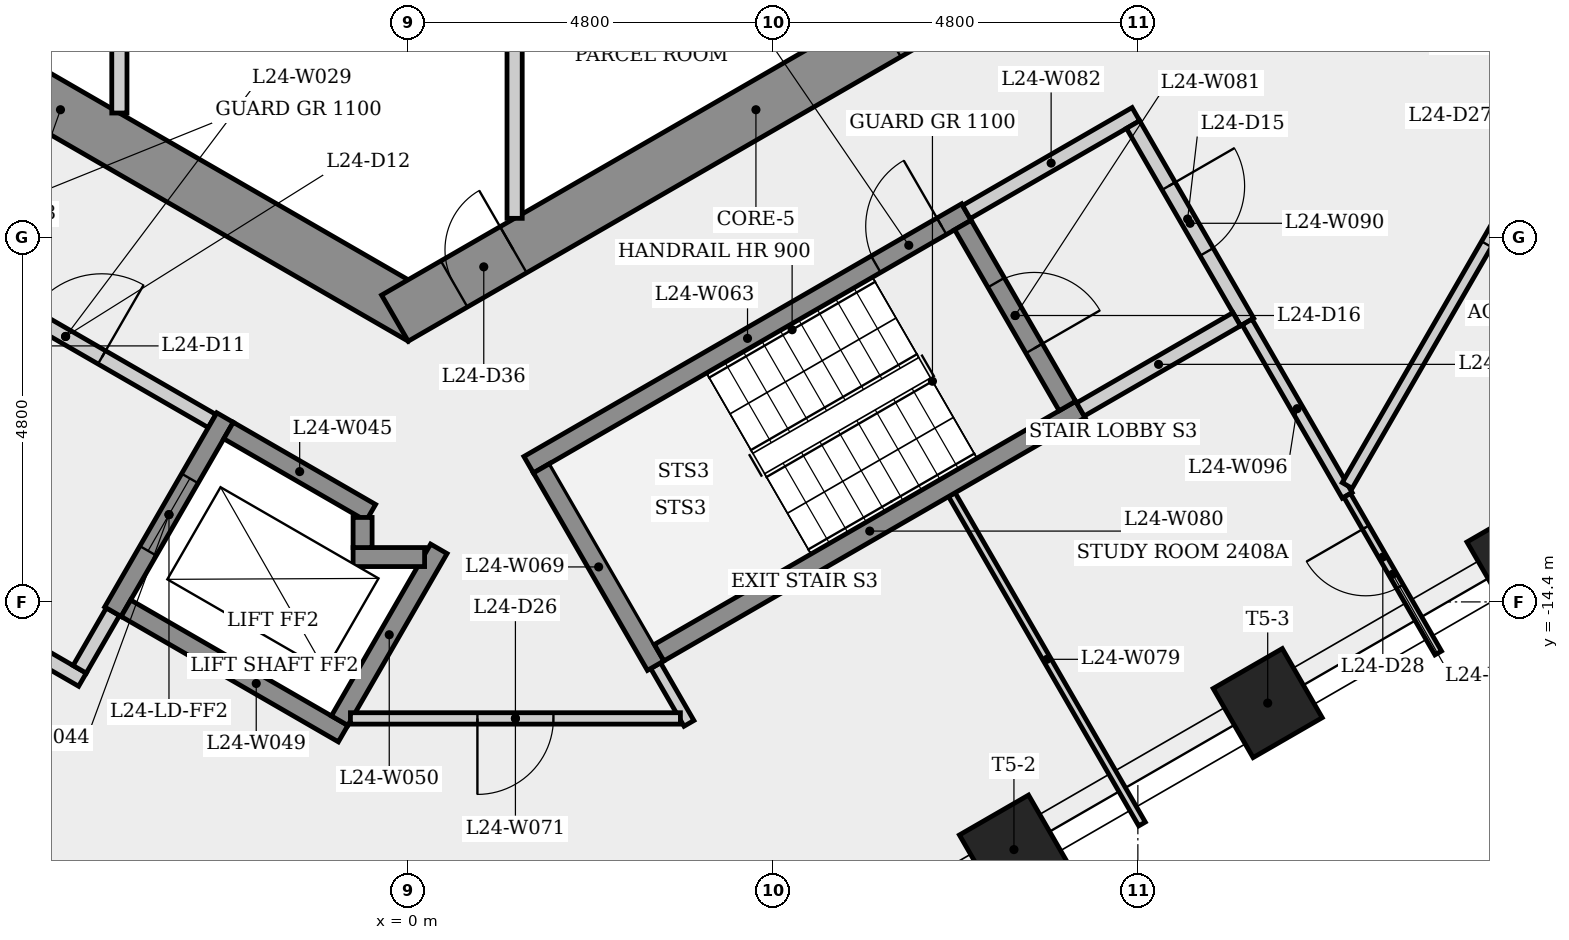
"""IFC4 building model, lengths in metres.
Left out: names, types, materials, properties, quantities, classifications, styles, units other than length and angle.
Written with IfcOpenShell. Run it as: python <this file> out.ifc"""

import sys

from ifc_helpers import new_model, si_unit, direction, frame, frame_2d, origin, origin_2d, place, context, subcontext, project, spatial, rectangle, extrude, element, fill, save


model = new_model("IFC4")
c1 = context("Model", 3, precision=1e-05, world=origin(), true_north=direction((0.0, 1.0)))
c2 = subcontext(c1, "Body", "Model", "MODEL_VIEW")
j1 = project(units=[si_unit("LENGTHUNIT", "METRE"), si_unit("PLANEANGLEUNIT", "RADIAN")], contexts=[c1])
p1 = place(None, origin())
s1 = spatial("IfcSite", under=j1, at=p1, CompositionType="ELEMENT")
p2 = place(p1, origin())
s2 = spatial("IfcBuilding", under=s1, at=p2, CompositionType="ELEMENT")
p3 = place(p2, frame((0.0, 0.0, 93.3)))
s3 = spatial("IfcBuildingStorey", under=s2, at=p3, CompositionType="ELEMENT", Elevation=93.3)
p4 = place(p3, frame((-9.325, -5.182, 0.0), z_axis=(0.0, 0.0, 1.0), x_axis=(0.866023993627, -0.500002442456, 0.0)))
e1 = element("IfcWall", 1, at=p4, inside=s3, PredefinedType="SHEAR", context=c2, shape_type="SweptSolid", body=[
    extrude(rectangle(XDim=10.97, YDim=0.7, at=frame_2d((5.485, 0.0))), origin(), (0.0, 0.0, 1.0), 3.4),
])
p5 = place(p4, frame((0.801, 0.0, 0.0)))
e2 = element("IfcOpeningElement", 2, at=p5, cuts=e1, PredefinedType="OPENING", context=c2, shape_type="SweptSolid", body=[
    extrude(rectangle(XDim=0.9, YDim=2.1, at=frame_2d((0.45, 1.05))), frame((0.0, 0.36, 0.0), z_axis=(0.0, -1.0, 0.0), x_axis=(1.0, 0.0, 0.0)), (0.0, 0.0, 1.0), 0.72),
])
p6 = place(p3, frame((-0.175, -10.667, 0.0), z_axis=(0.0, 0.0, 1.0), x_axis=(0.866023993627, 0.500002442456, 0.0)))
e3 = element("IfcWall", 3, at=p6, inside=s3, PredefinedType="SHEAR", context=c2, shape_type="SweptSolid", body=[
    extrude(rectangle(XDim=10.97, YDim=0.7, at=frame_2d((5.485, 0.0))), origin(), (0.0, 0.0, 1.0), 3.4),
])
p7 = place(p6, frame((0.9, 0.0, 0.0)))
e4 = element("IfcOpeningElement", 4, at=p7, cuts=e3, PredefinedType="OPENING", context=c2, shape_type="SweptSolid", body=[
    extrude(rectangle(XDim=0.9, YDim=2.1, at=frame_2d((0.45, 1.05))), frame((0.0, 0.36, 0.0), z_axis=(0.0, -1.0, 0.0), x_axis=(1.0, 0.0, 0.0)), (0.0, 0.0, 1.0), 0.72),
])
p8 = place(p6, frame((7.483, 0.0, 0.0)))
e5 = element("IfcOpeningElement", 5, at=p8, cuts=e3, PredefinedType="OPENING", context=c2, shape_type="SweptSolid", body=[
    extrude(rectangle(XDim=0.9, YDim=2.1, at=frame_2d((0.45, 1.05))), frame((0.0, 0.36, 0.0), z_axis=(0.0, -1.0, 0.0), x_axis=(1.0, 0.0, 0.0)), (0.0, 0.0, 1.0), 0.72),
])
for number, where, z_axis, x_axis in (
    (6, (7.969, -17.659, 0.0), (0.0, 0.0, 1.0), (0.5, -0.866, 0.0)),
    (7, (11.308, -15.731, 0.0), (0.0, 0.0, 1.0), (0.5, -0.866, 0.0)),
    (8, (14.647, -13.804, 0.0), (0.0, 0.0, 1.0), (0.5, -0.866, 0.0)),
):
    element("IfcColumn", number, at=place(p3, frame(where, z_axis=z_axis, x_axis=x_axis)), inside=s3, PredefinedType="COLUMN", context=c2, shape_type="SweptSolid", body=[
        extrude(rectangle(XDim=1.05, YDim=1.05, at=origin_2d()), origin(), (0.0, 0.0, 1.0), 3.4),
    ])
p9 = place(p3, frame((-6.435, -9.795, 0.0), z_axis=(0.0, 0.0, 1.0), x_axis=(0.866012907634, -0.500021643343, 0.0)))
e9 = element("IfcWall", 9, at=p9, inside=s3, PredefinedType="PARTITIONING", context=c2, shape_type="SweptSolid", body=[
    extrude(rectangle(XDim=4.45, YDim=0.2, at=frame_2d((2.225, 0.0))), origin(), (0.0, 0.0, 1.0), 3.05),
])
p10 = place(p9, frame((1.675, 0.0, 0.0)))
e10 = element("IfcOpeningElement", 10, at=p10, cuts=e9, PredefinedType="OPENING", context=c2, shape_type="SweptSolid", body=[
    extrude(rectangle(XDim=1.1, YDim=2.1, at=frame_2d((0.55, 1.05))), frame((0.0, 0.11, 0.0), z_axis=(0.0, -1.0, 0.0), x_axis=(1.0, 0.0, 0.0)), (0.0, 0.0, 1.0), 0.22),
])
p11 = place(p3, frame((-4.286, -15.423, 0.0), z_axis=(0.0, 0.0, 1.0), x_axis=(-0.866025371046, 0.500000056704, 0.0)))
e11 = element("IfcWall", 11, at=p11, inside=s3, PredefinedType="PARTITIONING", context=c2, shape_type="SweptSolid", body=[
    extrude(rectangle(XDim=1.7, YDim=0.2, at=frame_2d((0.85, 0.0))), origin(), (0.0, 0.0, 1.0), 3.05),
])
p12 = place(p3, frame((-3.885, -14.529, 0.0), z_axis=(0.0, 0.0, 1.0), x_axis=(-0.499859285417, -0.866106630146, 0.0)))
e12 = element("IfcWall", 12, at=p12, inside=s3, PredefinedType="PARTITIONING", context=c2, shape_type="SweptSolid", body=[
    extrude(rectangle(XDim=0.875, YDim=0.2, at=frame_2d((0.438, 0.0))), origin(), (0.0, 0.0, 1.0), 3.05),
])
p13 = place(p3, frame((-3.8, -5.275, 0.0), z_axis=(0.0, 0.0, 1.0), x_axis=(0.0, -1.0, 0.0)))
e13 = element("IfcWall", 13, at=p13, inside=s3, PredefinedType="PARTITIONING", context=c2, shape_type="SweptSolid", body=[
    extrude(rectangle(XDim=2.692, YDim=0.2, at=frame_2d((1.346, 0.0))), origin(), (0.0, 0.0, 1.0), 3.05),
])
p14 = place(p3, frame((-2.41, -11.974, 0.0), z_axis=(0.0, 0.0, 1.0), x_axis=(-0.500001826776, -0.866024349092, 0.0)))
e14 = element("IfcWall", 14, at=p14, inside=s3, PredefinedType="SHEAR", context=c2, shape_type="SweptSolid", body=[
    extrude(rectangle(XDim=2.95, YDim=0.25, at=frame_2d((1.475, 0.0))), origin(), (0.0, 0.0, 1.0), 3.05),
])
p15 = place(p14, frame((0.925, 0.0, 0.0)))
e15 = element("IfcOpeningElement", 15, at=p15, cuts=e14, PredefinedType="OPENING", context=c2, shape_type="SweptSolid", body=[
    extrude(rectangle(XDim=1.1, YDim=2.1, at=frame_2d((0.55, 1.05))), frame((0.0, 0.135, 0.0), z_axis=(0.0, -1.0, 0.0), x_axis=(1.0, 0.0, 0.0)), (0.0, 0.0, 1.0), 0.27),
])
p16 = place(p3, frame((-2.364, -12.145, 0.0), z_axis=(0.0, 0.0, 1.0), x_axis=(0.86603892542, -0.499976579108, 0.0)))
e16 = element("IfcWall", 16, at=p16, inside=s3, PredefinedType="SHEAR", context=c2, shape_type="SweptSolid", body=[
    extrude(rectangle(XDim=2.162, YDim=0.25, at=frame_2d((1.081, 0.0))), origin(), (0.0, 0.0, 1.0), 3.05),
])
p17 = place(p3, frame((-0.856, -16.133, 0.0), z_axis=(0.0, 0.0, 1.0), x_axis=(-0.866021716278, 0.500006386895, 0.0)))
e17 = element("IfcWall", 17, at=p17, inside=s3, PredefinedType="SHEAR", context=c2, shape_type="SweptSolid", body=[
    extrude(rectangle(XDim=3.3, YDim=0.25, at=frame_2d((1.65, 0.0))), origin(), (0.0, 0.0, 1.0), 3.05),
])
p18 = place(p3, frame((-0.902, -15.962, 0.0), z_axis=(0.0, 0.0, 1.0), x_axis=(0.499981517636, 0.866036074319, 0.0)))
e18 = element("IfcWall", 18, at=p18, inside=s3, PredefinedType="SHEAR", context=c2, shape_type="SweptSolid", body=[
    extrude(rectangle(XDim=2.61, YDim=0.25, at=frame_2d((1.305, 0.0))), origin(), (0.0, 0.0, 1.0), 3.05),
])
p19 = place(p3, frame((-0.725, -13.81, 0.0), z_axis=(0.0, 0.0, 1.0), x_axis=(1.0, 0.0, 0.0)))
e19 = element("IfcWall", 19, at=p19, inside=s3, PredefinedType="SHEAR", context=c2, shape_type="SweptSolid", body=[
    extrude(rectangle(XDim=0.941, YDim=0.25, at=frame_2d((0.47, 0.0))), origin(), (0.0, 0.0, 1.0), 3.4),
])
p20 = place(p3, frame((-0.6, -13.289, 0.0), z_axis=(0.0, 0.0, 1.0), x_axis=(0.0, -1.0, 0.0)))
e20 = element("IfcWall", 20, at=p20, inside=s3, PredefinedType="SHEAR", context=c2, shape_type="SweptSolid", body=[
    extrude(rectangle(XDim=0.396, YDim=0.25, at=frame_2d((0.198, 0.0))), origin(), (0.0, 0.0, 1.0), 3.4),
])
p21 = place(p3, frame((1.4, -5.275, 0.0), z_axis=(0.0, 0.0, 1.0), x_axis=(0.0, -1.0, 0.0)))
e21 = element("IfcWall", 21, at=p21, inside=s3, PredefinedType="PARTITIONING", context=c2, shape_type="SweptSolid", body=[
    extrude(rectangle(XDim=4.078, YDim=0.2, at=frame_2d((2.039, 0.0))), origin(), (0.0, 0.0, 1.0), 3.05),
])
p22 = place(p3, frame((1.585, -12.595, 0.0), z_axis=(0.0, 0.0, 1.0), x_axis=(0.866036417653, 0.499980922934, 0.0)))
e22 = element("IfcWall", 22, at=p22, inside=s3, PredefinedType="SHEAR", context=c2, shape_type="SweptSolid", body=[
    extrude(rectangle(XDim=6.65, YDim=0.25, at=frame_2d((3.325, 0.0))), origin(), (0.0, 0.0, 1.0), 3.05),
])
p23 = place(p22, frame((5.275, 0.0, 0.0)))
e23 = element("IfcOpeningElement", 23, at=p23, cuts=e22, PredefinedType="OPENING", context=c2, shape_type="SweptSolid", body=[
    extrude(rectangle(XDim=1.0, YDim=2.1, at=frame_2d((0.5, 1.05))), frame((0.0, 0.135, 0.0), z_axis=(0.0, -1.0, 0.0), x_axis=(1.0, 0.0, 0.0)), (0.0, 0.0, 1.0), 0.27),
])
p24 = place(p3, frame((3.256, -15.239, 0.0), z_axis=(0.0, 0.0, 1.0), x_axis=(0.499883169583, -0.866092845351, 0.0)))
e24 = element("IfcWall", 24, at=p24, inside=s3, PredefinedType="PARTITIONING", context=c2, shape_type="SweptSolid", body=[
    extrude(rectangle(XDim=0.877, YDim=0.15, at=frame_2d((0.438, 0.0))), origin(), (0.0, 0.0, 1.0), 3.05),
])
p25 = place(p3, frame((3.256, -15.239, 0.0), z_axis=(0.0, 0.0, 1.0), x_axis=(-0.50002537861, 0.866010750942, 0.0)))
e25 = element("IfcWall", 25, at=p25, inside=s3, PredefinedType="SHEAR", context=c2, shape_type="SweptSolid", body=[
    extrude(rectangle(XDim=3.0, YDim=0.25, at=frame_2d((1.5, 0.0))), origin(), (0.0, 0.0, 1.0), 3.05),
])
p26 = place(p3, frame((3.581, -15.933, 0.0), z_axis=(0.0, 0.0, 1.0), x_axis=(-1.0, 0.0, 0.0)))
e26 = element("IfcWall", 26, at=p26, inside=s3, PredefinedType="PARTITIONING", context=c2, shape_type="SweptSolid", body=[
    extrude(rectangle(XDim=4.341, YDim=0.15, at=frame_2d((2.171, 0.0))), origin(), (0.0, 0.0, 1.0), 3.05),
])
p27 = place(p26, frame((1.671, 0.0, 0.0)))
e27 = element("IfcOpeningElement", 27, at=p27, cuts=e26, PredefinedType="OPENING", context=c2, shape_type="SweptSolid", body=[
    extrude(rectangle(XDim=1.0, YDim=2.1, at=frame_2d((0.5, 1.05))), frame((0.0, 0.085, 0.0), z_axis=(0.0, -1.0, 0.0), x_axis=(1.0, 0.0, 0.0)), (0.0, 0.0, 1.0), 0.17),
])
p28 = place(p3, frame((7.153, -12.989, 0.0), z_axis=(0.0, 0.0, 1.0), x_axis=(0.500022324899, -0.866012514114, 0.0)))
e28 = element("IfcWall", 28, at=p28, inside=s3, PredefinedType="PARTITIONING", context=c2, shape_type="SweptSolid", body=[
    extrude(rectangle(XDim=5.004, YDim=0.1, at=frame_2d((2.502, 0.0))), origin(), (0.0, 0.0, 1.0), 3.05),
])
p29 = place(p3, frame((3.301, -15.068, 0.0), z_axis=(0.0, 0.0, 1.0), x_axis=(0.866035036182, 0.499983315828, 0.0)))
e29 = element("IfcWall", 29, at=p29, inside=s3, PredefinedType="SHEAR", context=c2, shape_type="SweptSolid", body=[
    extrude(rectangle(XDim=6.4, YDim=0.25, at=frame_2d((3.2, 0.0))), origin(), (0.0, 0.0, 1.0), 3.05),
])
p30 = place(p3, frame((7.298, -9.441, 0.0), z_axis=(0.0, 0.0, 1.0), x_axis=(0.500034990121, -0.866005201286, 0.0)))
e30 = element("IfcWall", 30, at=p30, inside=s3, PredefinedType="SHEAR", context=c2, shape_type="SweptSolid", body=[
    extrude(rectangle(XDim=2.75, YDim=0.25, at=frame_2d((1.375, 0.0))), origin(), (0.0, 0.0, 1.0), 3.05),
])
p31 = place(p30, frame((0.875, 0.0, 0.0)))
e31 = element("IfcOpeningElement", 31, at=p31, cuts=e30, PredefinedType="OPENING", context=c2, shape_type="SweptSolid", body=[
    extrude(rectangle(XDim=1.0, YDim=2.1, at=frame_2d((0.5, 1.05))), frame((0.0, 0.135, 0.0), z_axis=(0.0, -1.0, 0.0), x_axis=(1.0, 0.0, 0.0)), (0.0, 0.0, 1.0), 0.27),
])
p32 = place(p3, frame((7.344, -9.27, 0.0), z_axis=(0.0, 0.0, 1.0), x_axis=(0.866005588531, 0.500034319456, 0.0)))
e32 = element("IfcWall", 32, at=p32, inside=s3, PredefinedType="PARTITIONING", context=c2, shape_type="SweptSolid", body=[
    extrude(rectangle(XDim=2.575, YDim=0.2, at=frame_2d((1.288, 0.0))), origin(), (0.0, 0.0, 1.0), 3.05),
])
p33 = place(p3, frame((9.537, -8.119, 0.0), z_axis=(0.0, 0.0, 1.0), x_axis=(0.499990139034, -0.866031096941, 0.0)))
e33 = element("IfcWall", 33, at=p33, inside=s3, PredefinedType="PARTITIONING", context=c2, shape_type="SweptSolid", body=[
    extrude(rectangle(XDim=3.0, YDim=0.2, at=frame_2d((1.5, 0.0))), origin(), (0.0, 0.0, 1.0), 3.05),
])
p34 = place(p33, frame((0.935, 0.0, 0.0)))
e34 = element("IfcOpeningElement", 34, at=p34, cuts=e33, PredefinedType="OPENING", context=c2, shape_type="SweptSolid", body=[
    extrude(rectangle(XDim=1.0, YDim=2.1, at=frame_2d((0.5, 1.05))), frame((0.0, 0.11, 0.0), z_axis=(0.0, -1.0, 0.0), x_axis=(1.0, 0.0, 0.0)), (0.0, 0.0, 1.0), 0.22),
])
p35 = place(p3, frame((10.901, -10.681, 0.0), z_axis=(0.0, 0.0, 1.0), x_axis=(-0.866007538022, -0.500030943131, 0.0)))
e35 = element("IfcWall", 35, at=p35, inside=s3, PredefinedType="PARTITIONING", context=c2, shape_type="SweptSolid", body=[
    extrude(rectangle(XDim=2.375, YDim=0.2, at=frame_2d((1.188, 0.0))), origin(), (0.0, 0.0, 1.0), 3.05),
])
p36 = place(p3, frame((12.354, -12.998, 0.0), z_axis=(0.0, 0.0, 1.0), x_axis=(-0.49998723852, 0.866032771503, 0.0)))
e36 = element("IfcWall", 36, at=p36, inside=s3, PredefinedType="PARTITIONING", context=c2, shape_type="SweptSolid", body=[
    extrude(rectangle(XDim=2.634, YDim=0.15, at=frame_2d((1.317, 0.0))), origin(), (0.0, 0.0, 1.0), 3.05),
])
p37 = place(p3, frame((13.552, -15.072, 0.0), z_axis=(0.0, 0.0, 1.0), x_axis=(-0.499954846121, 0.866051471819, 0.0)))
e37 = element("IfcWall", 37, at=p37, inside=s3, PredefinedType="PARTITIONING", context=c2, shape_type="SweptSolid", body=[
    extrude(rectangle(XDim=2.395, YDim=0.1, at=frame_2d((1.197, 0.0))), origin(), (0.0, 0.0, 1.0), 3.05),
])
p38 = place(p37, frame((1.008, 0.0, 0.0)))
e38 = element("IfcOpeningElement", 38, at=p38, cuts=e37, PredefinedType="OPENING", context=c2, shape_type="SweptSolid", body=[
    extrude(rectangle(XDim=0.9, YDim=2.1, at=frame_2d((0.45, 1.05))), frame((0.0, 0.06, 0.0), z_axis=(0.0, -1.0, 0.0), x_axis=(1.0, 0.0, 0.0)), (0.0, 0.0, 1.0), 0.12),
])
p39 = place(p3, frame((16.52, -5.652, 0.0), z_axis=(0.0, 0.0, 1.0), x_axis=(-0.499996383721, -0.866027491634, 0.0)))
e39 = element("IfcWall", 39, at=p39, inside=s3, PredefinedType="PARTITIONING", context=c2, shape_type="SweptSolid", body=[
    extrude(rectangle(XDim=8.332, YDim=0.15, at=frame_2d((4.166, 0.0))), origin(), (0.0, 0.0, 1.0), 3.05),
])
p40 = place(p39, frame((3.666, 0.0, 0.0)))
e40 = element("IfcOpeningElement", 40, at=p40, cuts=e39, PredefinedType="OPENING", context=c2, shape_type="SweptSolid", body=[
    extrude(rectangle(XDim=1.0, YDim=2.1, at=frame_2d((0.5, 1.05))), frame((0.0, 0.085, 0.0), z_axis=(0.0, -1.0, 0.0), x_axis=(1.0, 0.0, 0.0)), (0.0, 0.0, 1.0), 0.17),
])
p41 = place(p10, origin())
e41 = element("IfcDoor", 41, at=p41, inside=s3, OperationType="SINGLE_SWING_RIGHT", PredefinedType="DOOR", context=c2, shape_type="SweptSolid", body=[
    extrude(rectangle(XDim=1.1, YDim=2.1, at=frame_2d((0.55, 1.05))), frame((0.0, 0.025, 0.0), z_axis=(0.0, -1.0, 0.0), x_axis=(1.0, 0.0, 0.0)), (0.0, 0.0, 1.0), 0.05),
])
fill(e10, e41)
p42 = place(p15, origin())
e42 = element("IfcDoor", 42, at=p42, inside=s3, OperationType="SLIDING_TO_LEFT", PredefinedType="DOOR", context=c2, shape_type="SweptSolid", body=[
    extrude(rectangle(XDim=1.1, YDim=2.1, at=frame_2d((0.55, 1.05))), frame((0.0, 0.025, 0.0), z_axis=(0.0, -1.0, 0.0), x_axis=(1.0, 0.0, 0.0)), (0.0, 0.0, 1.0), 0.05),
])
fill(e15, e42)
p43 = place(p23, origin())
e43 = element("IfcDoor", 43, at=p43, inside=s3, OperationType="SINGLE_SWING_RIGHT", PredefinedType="DOOR", context=c2, shape_type="SweptSolid", body=[
    extrude(rectangle(XDim=1.0, YDim=2.1, at=frame_2d((0.5, 1.05))), frame((0.0, 0.025, 0.0), z_axis=(0.0, -1.0, 0.0), x_axis=(1.0, 0.0, 0.0)), (0.0, 0.0, 1.0), 0.05),
])
fill(e23, e43)
p44 = place(p34, origin())
e44 = element("IfcDoor", 44, at=p44, inside=s3, OperationType="SINGLE_SWING_LEFT", PredefinedType="DOOR", context=c2, shape_type="SweptSolid", body=[
    extrude(rectangle(XDim=1.0, YDim=2.1, at=frame_2d((0.5, 1.05))), frame((0.0, 0.025, 0.0), z_axis=(0.0, -1.0, 0.0), x_axis=(1.0, 0.0, 0.0)), (0.0, 0.0, 1.0), 0.05),
])
fill(e34, e44)
p45 = place(p31, origin())
e45 = element("IfcDoor", 45, at=p45, inside=s3, OperationType="SINGLE_SWING_RIGHT", PredefinedType="DOOR", context=c2, shape_type="SweptSolid", body=[
    extrude(rectangle(XDim=1.0, YDim=2.1, at=frame_2d((0.5, 1.05))), frame((0.0, 0.025, 0.0), z_axis=(0.0, -1.0, 0.0), x_axis=(1.0, 0.0, 0.0)), (0.0, 0.0, 1.0), 0.05),
])
fill(e31, e45)
p46 = place(p27, origin())
e46 = element("IfcDoor", 46, at=p46, inside=s3, OperationType="SINGLE_SWING_RIGHT", PredefinedType="DOOR", context=c2, shape_type="SweptSolid", body=[
    extrude(rectangle(XDim=1.0, YDim=2.1, at=frame_2d((0.5, 1.05))), frame((0.0, 0.025, 0.0), z_axis=(0.0, -1.0, 0.0), x_axis=(1.0, 0.0, 0.0)), (0.0, 0.0, 1.0), 0.05),
])
fill(e27, e46)
p47 = place(p40, origin())
e47 = element("IfcDoor", 47, at=p47, inside=s3, OperationType="SINGLE_SWING_LEFT", PredefinedType="DOOR", context=c2, shape_type="SweptSolid", body=[
    extrude(rectangle(XDim=1.0, YDim=2.1, at=frame_2d((0.5, 1.05))), frame((0.0, 0.025, 0.0), z_axis=(0.0, -1.0, 0.0), x_axis=(1.0, 0.0, 0.0)), (0.0, 0.0, 1.0), 0.05),
])
fill(e40, e47)
p48 = place(p38, origin())
e48 = element("IfcDoor", 48, at=p48, inside=s3, OperationType="SINGLE_SWING_RIGHT", PredefinedType="DOOR", context=c2, shape_type="SweptSolid", body=[
    extrude(rectangle(XDim=0.9, YDim=2.1, at=frame_2d((0.45, 1.05))), frame((0.0, 0.025, 0.0), z_axis=(0.0, -1.0, 0.0), x_axis=(1.0, 0.0, 0.0)), (0.0, 0.0, 1.0), 0.05),
])
fill(e38, e48)
p49 = place(p7, origin())
e49 = element("IfcDoor", 49, at=p49, inside=s3, OperationType="SINGLE_SWING_RIGHT", PredefinedType="DOOR", context=c2, shape_type="SweptSolid", body=[
    extrude(rectangle(XDim=0.9, YDim=2.1, at=frame_2d((0.45, 1.05))), frame((0.0, 0.025, 0.0), z_axis=(0.0, -1.0, 0.0), x_axis=(1.0, 0.0, 0.0)), (0.0, 0.0, 1.0), 0.05),
])
fill(e4, e49)
save(model, sys.argv[1])
